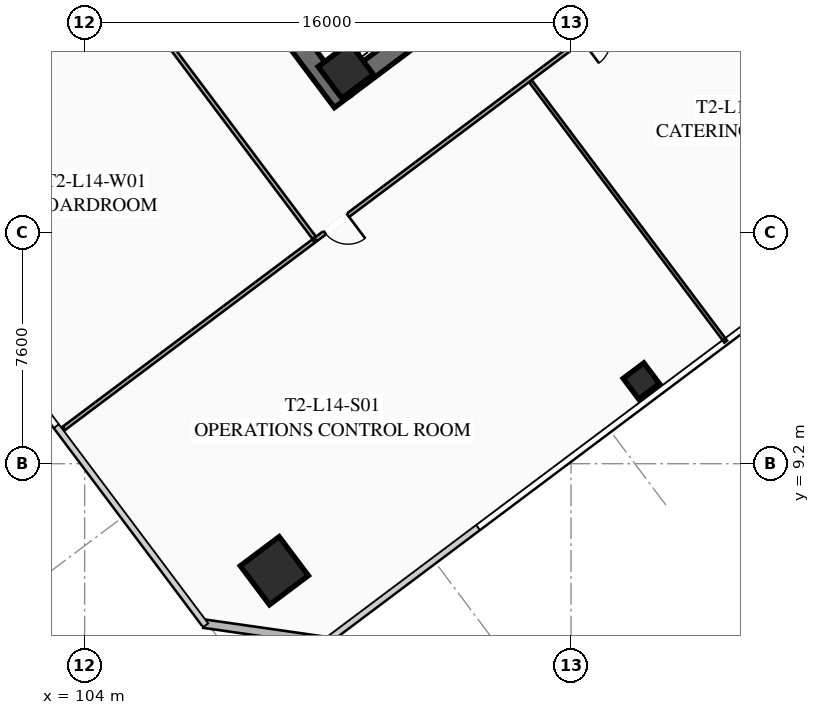
"""IFC4 building model, lengths in metres.
Left out: names, types, materials, properties, quantities, classifications, styles, units other than length and angle.
Written with IfcOpenShell. Run it as: python <this file> out.ifc"""

import sys

from ifc_helpers import new_model, si_unit, direction, frame, frame_2d, origin, origin_2d, place, context, subcontext, project, spatial, rectangle, hollow_rectangle, extrude, element, fill, save


model = new_model("IFC4")
c1 = context("Model", 3, precision=1e-05, world=origin(), true_north=direction((0.0, 1.0)))
c2 = subcontext(c1, "Body", "Model", "MODEL_VIEW")
j1 = project(units=[si_unit("LENGTHUNIT", "METRE"), si_unit("PLANEANGLEUNIT", "RADIAN")], contexts=[c1])
p1 = place(None, origin())
s1 = spatial("IfcSite", under=j1, at=p1, CompositionType="ELEMENT")
p2 = place(p1, origin())
s2 = spatial("IfcBuilding", under=s1, at=p2, CompositionType="ELEMENT")
p3 = place(p2, frame((0.0, 0.0, 56.55)))
s3 = spatial("IfcBuildingStorey", under=s2, at=p3, CompositionType="ELEMENT", Elevation=56.55)
p4 = place(p3, frame((112.476, 21.107, 0.0), z_axis=(0.0, 0.0, 1.0), x_axis=(-0.600005007985, 0.799996243986, 0.0)))
e1 = element("IfcWall", 1, at=p4, inside=s3, PredefinedType="SHEAR", context=c2, shape_type="SweptSolid", body=[
    extrude(rectangle(XDim=15.6, YDim=0.65, at=frame_2d((7.8, 0.0))), origin(), (0.0, 0.0, 1.0), 3.55),
])
p5 = place(p3, frame((124.429, 30.478, 0.0), z_axis=(0.0, 0.0, 1.0), x_axis=(-0.799998028465, -0.600002628705, 0.0)))
e2 = element("IfcWall", 2, at=p5, inside=s3, PredefinedType="SHEAR", context=c2, shape_type="SweptSolid", body=[
    extrude(rectangle(XDim=14.86, YDim=0.65, at=frame_2d((7.43, 0.0))), origin(), (0.0, 0.0, 1.0), 3.55),
])
p6 = place(p5, frame((9.13, 0.0, 0.0)))
e3 = element("IfcOpeningElement", 3, at=p6, cuts=e2, PredefinedType="OPENING", context=c2, shape_type="SweptSolid", body=[
    extrude(rectangle(XDim=1.25, YDim=2.25, at=frame_2d((0.625, 1.125))), frame((0.0, 0.335, 0.0), z_axis=(0.0, -1.0, 0.0), x_axis=(1.0, 0.0, 0.0)), (0.0, 0.0, 1.0), 0.67),
])
p7 = place(p5, frame((4.08, 0.0, 0.0)))
e4 = element("IfcOpeningElement", 4, at=p7, cuts=e2, PredefinedType="OPENING", context=c2, shape_type="SweptSolid", body=[
    extrude(rectangle(XDim=1.25, YDim=2.25, at=frame_2d((0.625, 1.125))), frame((0.0, 0.335, 0.0), z_axis=(0.0, -1.0, 0.0), x_axis=(1.0, 0.0, 0.0)), (0.0, 0.0, 1.0), 0.67),
])
p8 = place(p3, frame((112.59, 22.13, 0.0), z_axis=(0.0, 0.0, 1.0), x_axis=(0.799999996291, 0.600000004945, 0.0)))
e5 = element("IfcColumn", 5, at=p8, inside=s3, PredefinedType="COLUMN", context=c2, shape_type="SweptSolid", body=[
    extrude(hollow_rectangle(XDim=1.3, YDim=1.3, WallThickness=0.05, at=origin_2d()), origin(), (0.0, 0.0, 1.0), 3.35),
])
p9 = place(p3, frame((110.24, 5.68, 0.0), z_axis=(0.0, 0.0, 1.0), x_axis=(0.799999996291, 0.600000004945, 0.0)))
e6 = element("IfcColumn", 6, at=p9, inside=s3, PredefinedType="COLUMN", context=c2, shape_type="SweptSolid", body=[
    extrude(hollow_rectangle(XDim=1.6, YDim=1.6, WallThickness=0.06, at=origin_2d()), origin(), (0.0, 0.0, 1.0), 3.35),
])
p10 = place(p3, frame((122.31, 11.92, 0.0), z_axis=(0.0, 0.0, 1.0), x_axis=(0.799999996291, 0.600000004945, 0.0)))
e7 = element("IfcColumn", 7, at=p10, inside=s3, PredefinedType="COLUMN", context=c2, shape_type="SweptSolid", body=[
    extrude(hollow_rectangle(XDim=0.85, YDim=0.85, WallThickness=0.035, at=origin_2d()), origin(), (0.0, 0.0, 1.0), 3.35),
])
p11 = place(p3, frame((111.98, 3.36, 0.0), z_axis=(0.0, 0.0, 1.0), x_axis=(-0.989955445613, 0.14137968631, 0.0)))
e8 = element("IfcWall", 8, at=p11, inside=s3, PredefinedType="SOLIDWALL", context=c2, shape_type="SweptSolid", body=[
    extrude(rectangle(XDim=4.101, YDim=0.28, at=frame_2d((2.051, 0.0))), origin(), (0.0, 0.0, 1.0), 3.35),
])
p12 = place(p3, frame((135.46, 34.47, 0.0), z_axis=(0.0, 0.0, 1.0), x_axis=(-0.800000982127, -0.599998690494, 0.0)))
e9 = element("IfcWall", 9, at=p12, inside=s3, PredefinedType="PARTITIONING", context=c2, shape_type="SweptSolid", body=[
    extrude(rectangle(XDim=29.83, YDim=0.135, at=frame_2d((14.915, 0.0))), origin(), (0.0, 0.0, 1.0), 2.703),
])
p13 = place(p12, frame((28.5, 0.0, 0.0)))
e10 = element("IfcOpeningElement", 10, at=p13, cuts=e9, PredefinedType="OPENING", context=c2, shape_type="SweptSolid", body=[
    extrude(rectangle(XDim=0.95, YDim=2.05, at=frame_2d((0.475, 1.025))), frame((0.0, 0.077, 0.0), z_axis=(0.0, -1.0, 0.0), x_axis=(1.0, 0.0, 0.0)), (0.0, 0.0, 1.0), 0.155),
])
p14 = place(p12, frame((17.938, 0.0, 0.0)))
e11 = element("IfcOpeningElement", 11, at=p14, cuts=e9, PredefinedType="OPENING", context=c2, shape_type="SweptSolid", body=[
    extrude(rectangle(XDim=0.95, YDim=2.05, at=frame_2d((0.475, 1.025))), frame((0.0, 0.077, 0.0), z_axis=(0.0, -1.0, 0.0), x_axis=(1.0, 0.0, 0.0)), (0.0, 0.0, 1.0), 0.155),
])
p15 = place(p12, frame((0.38, 0.0, 0.0)))
e12 = element("IfcOpeningElement", 12, at=p15, cuts=e9, PredefinedType="OPENING", context=c2, shape_type="SweptSolid", body=[
    extrude(rectangle(XDim=0.95, YDim=2.05, at=frame_2d((0.475, 1.025))), frame((0.0, 0.077, 0.0), z_axis=(0.0, -1.0, 0.0), x_axis=(1.0, 0.0, 0.0)), (0.0, 0.0, 1.0), 0.155),
])
p16 = place(p3, frame((125.088, 13.216, 0.0), z_axis=(0.0, 0.0, 1.0), x_axis=(-0.600003650761, 0.799997261916, 0.0)))
e13 = element("IfcWall", 13, at=p16, inside=s3, PredefinedType="PARTITIONING", context=c2, shape_type="SweptSolid", body=[
    extrude(rectangle(XDim=10.7, YDim=0.11, at=frame_2d((5.35, 0.0))), origin(), (0.0, 0.0, 1.0), 2.703),
])
p17 = place(p3, frame((111.548, 16.636, 0.0), z_axis=(0.0, 0.0, 1.0), x_axis=(-0.600003517529, 0.799997361841, 0.0)))
e14 = element("IfcWall", 14, at=p17, inside=s3, PredefinedType="PARTITIONING", context=c2, shape_type="SweptSolid", body=[
    extrude(rectangle(XDim=22.21, YDim=0.135, at=frame_2d((11.105, 0.0))), origin(), (0.0, 0.0, 1.0), 2.703),
])
p18 = place(p17, frame((20.96, 0.0, 0.0)))
e15 = element("IfcOpeningElement", 15, at=p18, cuts=e14, PredefinedType="OPENING", context=c2, shape_type="SweptSolid", body=[
    extrude(rectangle(XDim=0.95, YDim=2.05, at=frame_2d((0.475, 1.025))), frame((0.0, 0.077, 0.0), z_axis=(0.0, -1.0, 0.0), x_axis=(1.0, 0.0, 0.0)), (0.0, 0.0, 1.0), 0.155),
])
p19 = place(p3, frame((103.316, 10.362, 0.0), z_axis=(0.0, 0.0, 1.0), x_axis=(0.80000855794, 0.599988589244, 0.0)))
e16 = element("IfcWall", 16, at=p19, inside=s3, PredefinedType="PARTITIONING", context=c2, shape_type="SweptSolid", body=[
    extrude(rectangle(XDim=10.27, YDim=0.135, at=frame_2d((5.135, 0.0))), origin(), (0.0, 0.0, 1.0), 2.703),
])
p20 = place(p13, origin())
e17 = element("IfcDoor", 17, at=p20, inside=s3, OperationType="SINGLE_SWING_LEFT", PredefinedType="DOOR", context=c2, shape_type="SweptSolid", body=[
    extrude(rectangle(XDim=0.95, YDim=2.05, at=frame_2d((0.475, 1.025))), frame((0.0, 0.025, 0.0), z_axis=(0.0, -1.0, 0.0), x_axis=(1.0, 0.0, 0.0)), (0.0, 0.0, 1.0), 0.05),
])
fill(e10, e17)
save(model, sys.argv[1])
